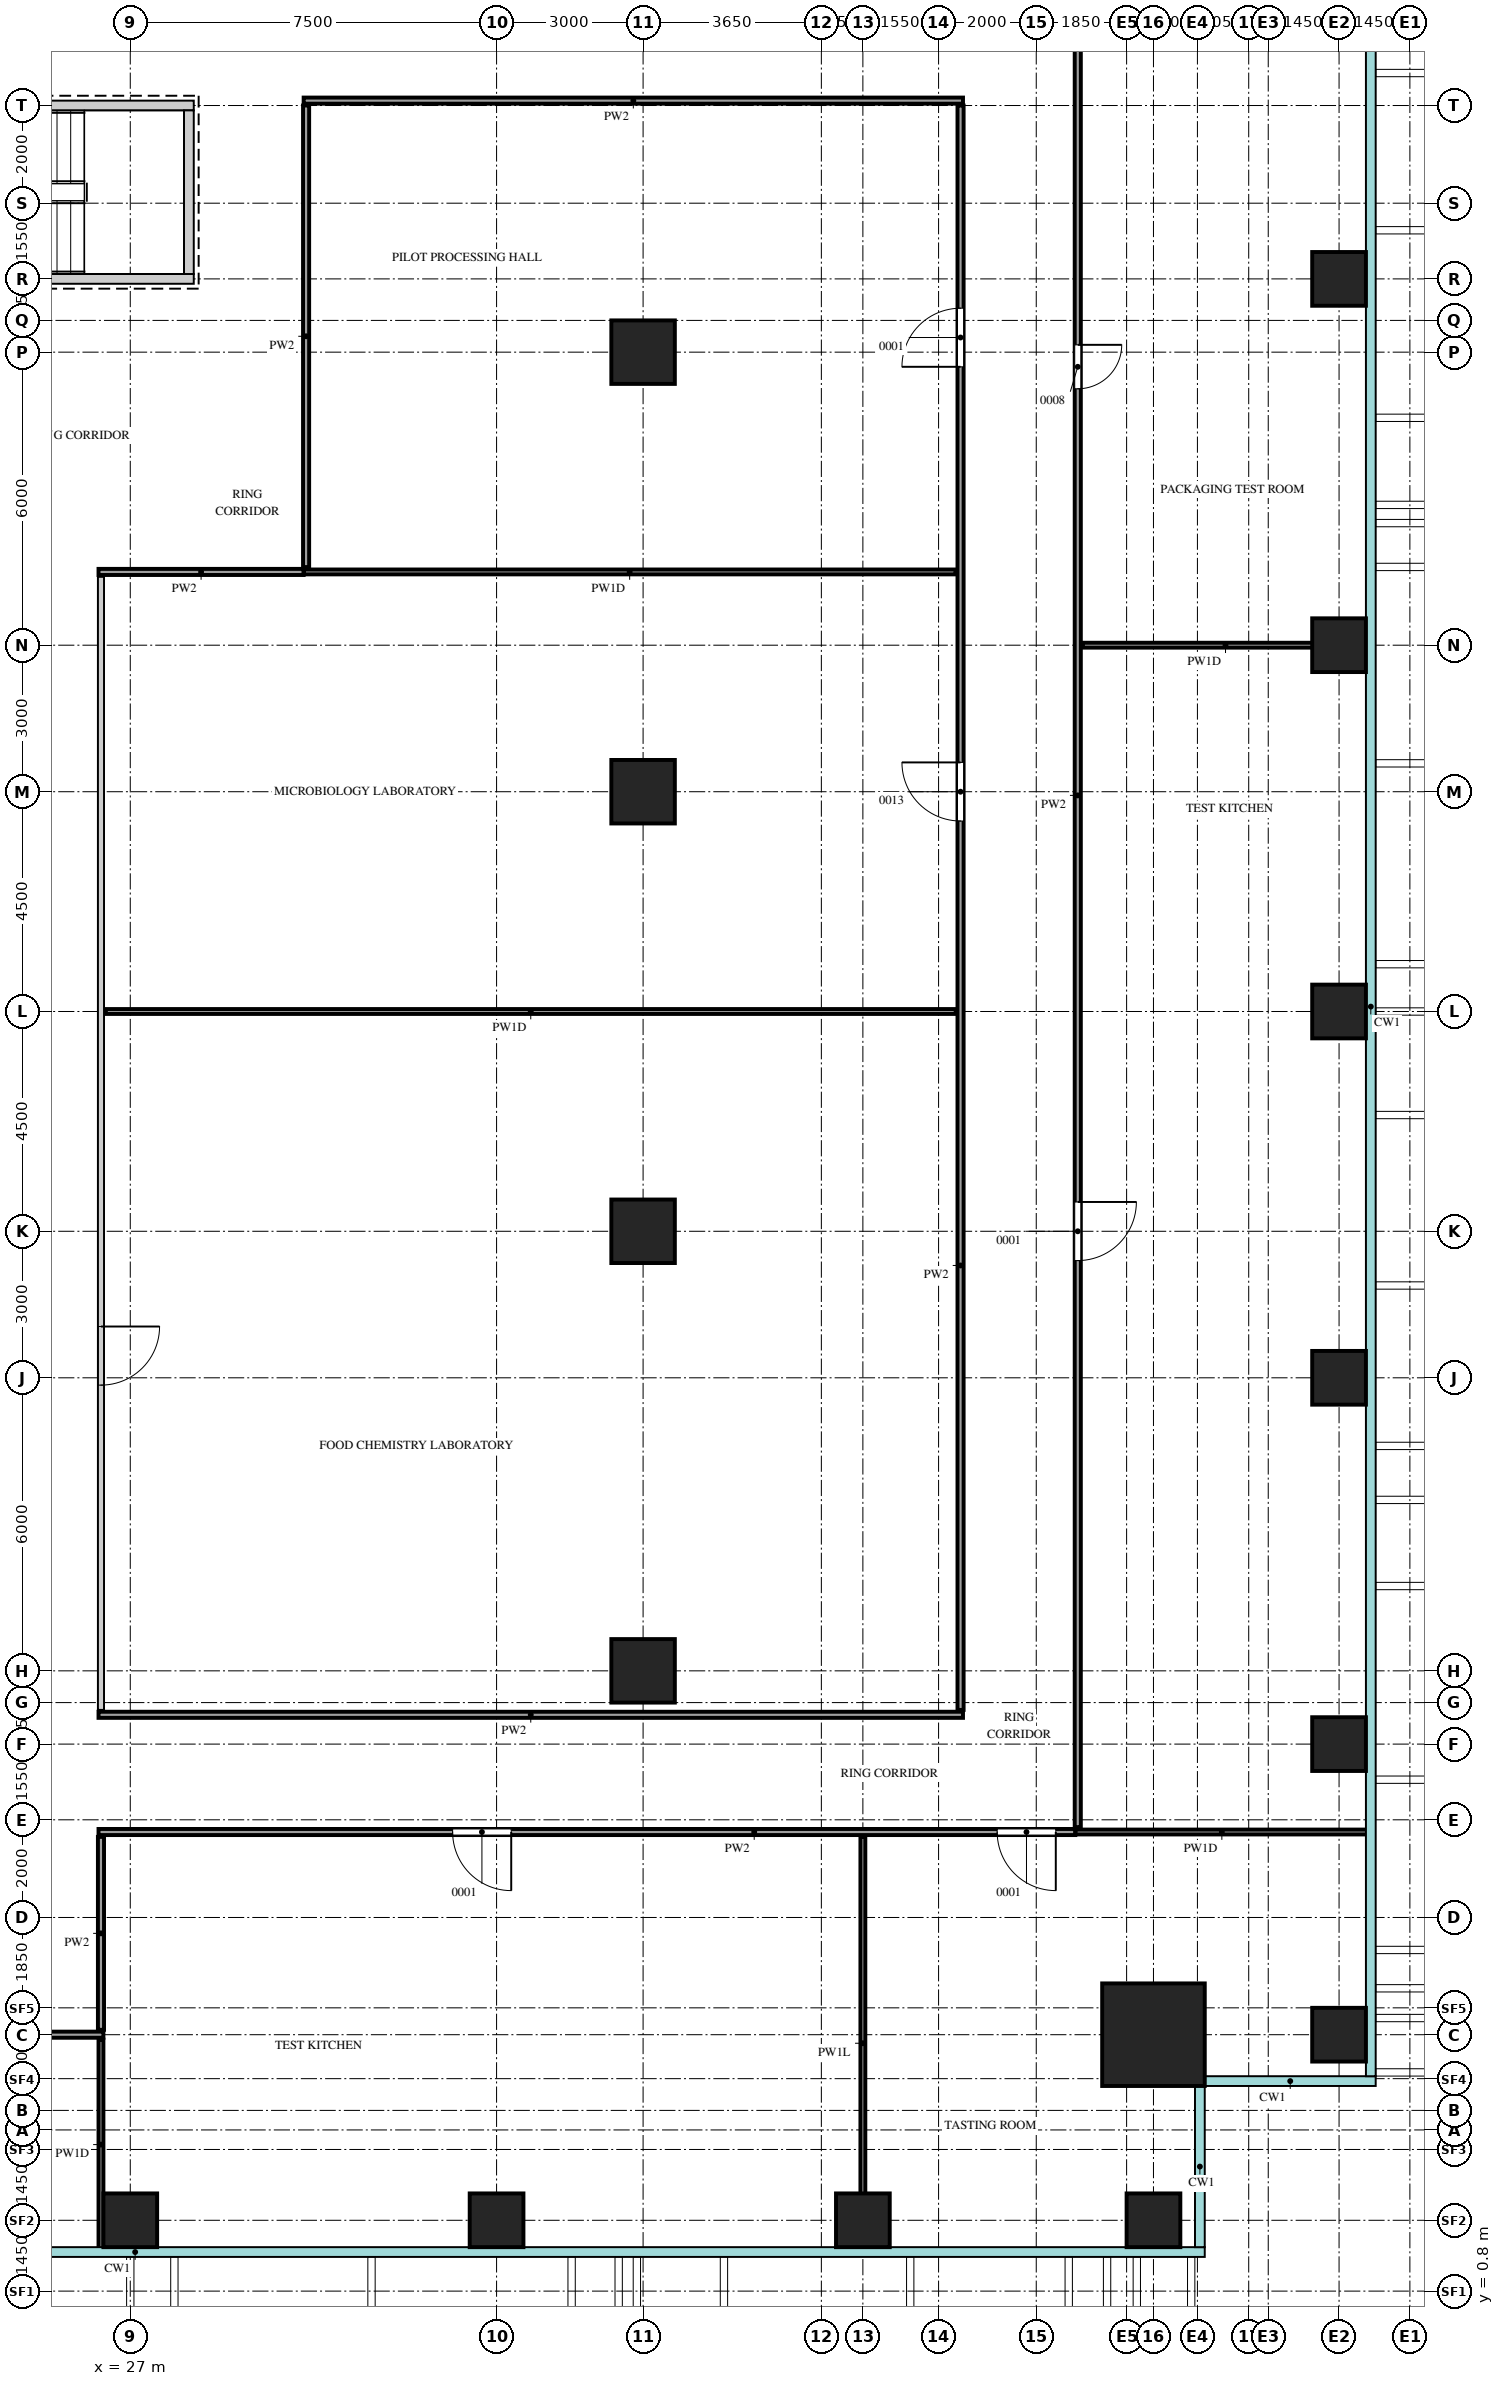
"""IFC4 building model, lengths in metres.
Left out: names, types, materials, properties, quantities, classifications, styles, units other than length and angle.
Written with IfcOpenShell. Run it as: python <this file> out.ifc"""

import sys

from ifc_helpers import new_model, si_unit, direction, frame, frame_2d, origin, origin_2d, place, context, subcontext, project, spatial, rectangle, extrude, source, transform, mapped, element, fill, save


model = new_model("IFC4")
c1 = context("Model", 3, precision=1e-05, world=origin(), true_north=direction((0.0, 1.0)))
c2 = subcontext(c1, "Body", "Model", "MODEL_VIEW")
j1 = project(units=[si_unit("LENGTHUNIT", "METRE"), si_unit("PLANEANGLEUNIT", "RADIAN")], contexts=[c1])
p1 = place(None, origin())
s1 = spatial("IfcSite", under=j1, at=p1, CompositionType="ELEMENT")
p2 = place(p1, origin())
s2 = spatial("IfcBuilding", under=s1, at=p2, CompositionType="ELEMENT")
p3 = place(p2, frame((0.0, 0.0, 114.7)))
s3 = spatial("IfcBuildingStorey", under=s2, at=p3, CompositionType="ELEMENT", Elevation=114.7)
m1 = source(origin(), c2, "Body", "SweptSolid", [
    extrude(rectangle(XDim=7.1, YDim=0.2, at=frame_2d((3.55, 0.0))), origin(), (0.0, 0.0, 1.0), 4.1),
])
p4 = place(p3, frame((21.2, 45.55, 0.0), z_axis=(0.0, 0.0, 1.0), x_axis=(1.0, 0.0, 0.0)))
e1 = element("IfcWall", 1, at=p4, inside=s3, PredefinedType="SHEAR", context=c2, shape_type="MappedRepresentation", body=[
    mapped(m1, transform((0.0, 0.0, 0.0))),
])
m2 = source(origin(), c2, "Body", "SweptSolid", [
    extrude(rectangle(XDim=1.2, YDim=2.1, at=frame_2d((0.6, 1.05))), frame((0.0, 0.11, 0.0), z_axis=(0.0, -1.0, 0.0), x_axis=(1.0, 0.0, 0.0)), (0.0, 0.0, 1.0), 0.22),
])
p5 = place(p4, frame((0.15, 0.0, 0.0)))
e2 = element("IfcOpeningElement", 2, at=p5, cuts=e1, PredefinedType="OPENING", context=c2, shape_type="MappedRepresentation", body=[
    mapped(m2, transform((0.0, 0.0, 0.0))),
])
p6 = place(p3, frame((21.2, 42.0, 0.0), z_axis=(0.0, 0.0, 1.0), x_axis=(1.0, 0.0, 0.0)))
e3 = element("IfcWall", 3, at=p6, inside=s3, PredefinedType="SHEAR", context=c2, shape_type="MappedRepresentation", body=[
    mapped(m1, transform((0.0, 0.0, 0.0))),
])
m3 = source(origin(), c2, "Body", "SweptSolid", [
    extrude(rectangle(XDim=3.35, YDim=0.2, at=frame_2d((1.675, 0.0))), origin(), (0.0, 0.0, 1.0), 4.1),
])
p7 = place(p3, frame((28.2, 42.1, 0.0), z_axis=(0.0, 0.0, 1.0), x_axis=(0.0, 1.0, 0.0)))
e4 = element("IfcWall", 4, at=p7, inside=s3, PredefinedType="SHEAR", context=c2, shape_type="MappedRepresentation", body=[
    mapped(m3, transform((0.0, 0.0, 0.0))),
])
m4 = source(origin(), c2, "Body", "SweptSolid", [
    extrude(rectangle(XDim=2.1, YDim=2.1, at=origin_2d()), origin(), (0.0, 0.0, 1.0), 4.4),
])
p8 = place(p3, frame((47.95, 6.05, 0.0), z_axis=(0.0, 0.0, 1.0), x_axis=(1.0, 0.0, 0.0)))
e5 = element("IfcColumn", 5, at=p8, inside=s3, PredefinedType="COLUMN", context=c2, shape_type="MappedRepresentation", body=[
    mapped(m4, transform((0.0, 0.0, 0.0))),
])
m5 = source(origin(), c2, "Body", "SweptSolid", [
    extrude(rectangle(XDim=1.1, YDim=1.1, at=origin_2d()), origin(), (0.0, 0.0, 1.0), 4.1),
])
for number, where, z_axis, x_axis in (
    (6, (27.0, 2.25, 0.0), (0.0, 0.0, 1.0), (1.0, 0.0, 0.0)),
    (7, (34.5, 2.25, 0.0), (0.0, 0.0, 1.0), (1.0, 0.0, 0.0)),
    (8, (42.0, 2.25, 0.0), (0.0, 0.0, 1.0), (1.0, 0.0, 0.0)),
    (9, (47.95, 2.25, 0.0), (0.0, 0.0, 1.0), (1.0, 0.0, 0.0)),
    (10, (51.75, 6.05, 0.0), (0.0, 0.0, 1.0), (1.0, 0.0, 0.0)),
    (11, (51.75, 12.0, 0.0), (0.0, 0.0, 1.0), (1.0, 0.0, 0.0)),
    (12, (51.75, 19.5, 0.0), (0.0, 0.0, 1.0), (1.0, 0.0, 0.0)),
    (13, (51.75, 27.0, 0.0), (0.0, 0.0, 1.0), (1.0, 0.0, 0.0)),
    (14, (51.75, 34.5, 0.0), (0.0, 0.0, 1.0), (1.0, 0.0, 0.0)),
    (15, (51.75, 42.0, 0.0), (0.0, 0.0, 1.0), (1.0, 0.0, 0.0)),
):
    element("IfcColumn", number, at=place(p3, frame(where, z_axis=z_axis, x_axis=x_axis)), inside=s3, PredefinedType="COLUMN", context=c2, shape_type="MappedRepresentation", body=[
        mapped(m5, transform((0.0, 0.0, 0.0))),
    ])
m6 = source(origin(), c2, "Body", "SweptSolid", [
    extrude(rectangle(XDim=1.3, YDim=1.3, at=origin_2d()), origin(), (0.0, 0.0, 1.0), 4.1),
])
for number, where, z_axis, x_axis in (
    (16, (37.5, 13.5, 0.0), (0.0, 0.0, 1.0), (1.0, 0.0, 0.0)),
    (17, (37.5, 22.5, 0.0), (0.0, 0.0, 1.0), (1.0, 0.0, 0.0)),
    (18, (37.5, 31.5, 0.0), (0.0, 0.0, 1.0), (1.0, 0.0, 0.0)),
    (19, (37.5, 40.5, 0.0), (0.0, 0.0, 1.0), (1.0, 0.0, 0.0)),
):
    element("IfcColumn", number, at=place(p3, frame(where, z_axis=z_axis, x_axis=x_axis)), inside=s3, PredefinedType="COLUMN", context=c2, shape_type="MappedRepresentation", body=[
        mapped(m6, transform((0.0, 0.0, 0.0))),
    ])
m7 = source(origin(), c2, "Body", "SweptSolid", [
    extrude(rectangle(XDim=4.3, YDim=0.1, at=frame_2d((2.15, 0.0))), origin(), (0.0, 0.0, 1.0), 4.2),
])
p9 = place(p3, frame((26.4, 1.65, 0.0), z_axis=(0.0, 0.0, 1.0), x_axis=(0.0, 1.0, 0.0)))
e20 = element("IfcWall", 20, at=p9, inside=s3, PredefinedType="PARTITIONING", context=c2, shape_type="MappedRepresentation", body=[
    mapped(m7, transform((0.0, 0.0, 0.0))),
])
m8 = source(origin(), c2, "Body", "SweptSolid", [
    extrude(rectangle(XDim=8.45, YDim=0.1, at=frame_2d((4.225, 0.0))), origin(), (0.0, 0.0, 1.0), 3.6),
])
p10 = place(p3, frame((42.0, 1.65, 0.0), z_axis=(0.0, 0.0, 1.0), x_axis=(0.0, 1.0, 0.0)))
e21 = element("IfcWall", 21, at=p10, inside=s3, PredefinedType="PARTITIONING", context=c2, shape_type="MappedRepresentation", body=[
    mapped(m8, transform((0.0, 0.0, 0.0))),
])
m9 = source(origin(), c2, "Body", "SweptSolid", [
    extrude(rectangle(XDim=22.3, YDim=0.125, at=frame_2d((11.15, 0.0))), origin(), (0.0, 0.0, 1.0), 3.55),
])
p11 = place(p3, frame((4.15, 6.05, 0.0), z_axis=(0.0, 0.0, 1.0), x_axis=(1.0, 0.0, 0.0)))
e22 = element("IfcWall", 22, at=p11, inside=s3, PredefinedType="PARTITIONING", context=c2, shape_type="MappedRepresentation", body=[
    mapped(m9, transform((0.0, 0.0, 0.0))),
])
m10 = source(origin(), c2, "Body", "SweptSolid", [
    extrude(rectangle(XDim=0.9, YDim=2.1, at=frame_2d((0.45, 1.05))), frame((0.0, 0.073, 0.0), z_axis=(0.0, -1.0, 0.0), x_axis=(1.0, 0.0, 0.0)), (0.0, 0.0, 1.0), 0.145),
])
p12 = place(p11, frame((7.25, 0.0, 0.0)))
e23 = element("IfcOpeningElement", 23, at=p12, cuts=e22, PredefinedType="OPENING", context=c2, shape_type="MappedRepresentation", body=[
    mapped(m10, transform((0.0, 0.0, 0.0))),
])
p13 = place(p11, frame((18.35, 0.0, 0.0)))
e24 = element("IfcOpeningElement", 24, at=p13, cuts=e22, PredefinedType="OPENING", context=c2, shape_type="MappedRepresentation", body=[
    mapped(m10, transform((0.0, 0.0, 0.0))),
])
m11 = source(origin(), c2, "Body", "SweptSolid", [
    extrude(rectangle(XDim=3.95, YDim=0.125, at=frame_2d((1.975, 0.0))), origin(), (0.0, 0.0, 1.0), 4.2),
])
p14 = place(p3, frame((26.4, 6.15, 0.0), z_axis=(0.0, 0.0, 1.0), x_axis=(0.0, 1.0, 0.0)))
e25 = element("IfcWall", 25, at=p14, inside=s3, PredefinedType="PARTITIONING", context=c2, shape_type="MappedRepresentation", body=[
    mapped(m11, transform((0.0, 0.0, 0.0))),
])
m12 = source(origin(), c2, "Body", "SweptSolid", [
    extrude(rectangle(XDim=20.0, YDim=0.125, at=frame_2d((10.0, 0.0))), origin(), (0.0, 0.0, 1.0), 4.2),
])
p15 = place(p3, frame((26.35, 10.2, 0.0), z_axis=(0.0, 0.0, 1.0), x_axis=(1.0, 0.0, 0.0)))
e26 = element("IfcWall", 26, at=p15, inside=s3, PredefinedType="PARTITIONING", context=c2, shape_type="MappedRepresentation", body=[
    mapped(m12, transform((0.0, 0.0, 0.0))),
])
m13 = source(origin(), c2, "Body", "SweptSolid", [
    extrude(rectangle(XDim=1.2, YDim=2.1, at=frame_2d((0.6, 1.05))), frame((0.0, 0.073, 0.0), z_axis=(0.0, -1.0, 0.0), x_axis=(1.0, 0.0, 0.0)), (0.0, 0.0, 1.0), 0.145),
])
p16 = place(p15, frame((7.25, 0.0, 0.0)))
e27 = element("IfcOpeningElement", 27, at=p16, cuts=e26, PredefinedType="OPENING", context=c2, shape_type="MappedRepresentation", body=[
    mapped(m13, transform((0.0, 0.0, 0.0))),
])
p17 = place(p15, frame((18.4, 0.0, 0.0)))
e28 = element("IfcOpeningElement", 28, at=p17, cuts=e26, PredefinedType="OPENING", context=c2, shape_type="MappedRepresentation", body=[
    mapped(m13, transform((0.0, 0.0, 0.0))),
])
m14 = source(origin(), c2, "Body", "SweptSolid", [
    extrude(rectangle(XDim=6.0, YDim=0.1, at=frame_2d((3.0, 0.0))), origin(), (0.0, 0.0, 1.0), 4.2),
])
p18 = place(p3, frame((46.35, 10.2, 0.0), z_axis=(0.0, 0.0, 1.0), x_axis=(1.0, 0.0, 0.0)))
e29 = element("IfcWall", 29, at=p18, inside=s3, PredefinedType="PARTITIONING", context=c2, shape_type="MappedRepresentation", body=[
    mapped(m14, transform((0.0, 0.0, 0.0))),
])
m15 = source(origin(), c2, "Body", "SweptSolid", [
    extrude(rectangle(XDim=37.65, YDim=0.125, at=frame_2d((18.825, 0.0))), origin(), (0.0, 0.0, 1.0), 4.2),
])
p19 = place(p3, frame((46.4, 10.3, 0.0), z_axis=(0.0, 0.0, 1.0), x_axis=(0.0, 1.0, 0.0)))
e30 = element("IfcWall", 30, at=p19, inside=s3, PredefinedType="PARTITIONING", context=c2, shape_type="MappedRepresentation", body=[
    mapped(m15, transform((0.0, 0.0, 0.0))),
])
p20 = place(p19, frame((11.6, 0.0, 0.0)))
e31 = element("IfcOpeningElement", 31, at=p20, cuts=e30, PredefinedType="OPENING", context=c2, shape_type="MappedRepresentation", body=[
    mapped(m13, transform((0.0, 0.0, 0.0))),
])
p21 = place(p19, frame((29.45, 0.0, 0.0)))
e32 = element("IfcOpeningElement", 32, at=p21, cuts=e30, PredefinedType="OPENING", context=c2, shape_type="MappedRepresentation", body=[
    mapped(m10, transform((0.0, 0.0, 0.0))),
])
m16 = source(origin(), c2, "Body", "SweptSolid", [
    extrude(rectangle(XDim=17.7, YDim=0.125, at=frame_2d((8.85, 0.0))), origin(), (0.0, 0.0, 1.0), 4.2),
])
p22 = place(p3, frame((26.35, 12.6, 0.0), z_axis=(0.0, 0.0, 1.0), x_axis=(1.0, 0.0, 0.0)))
e33 = element("IfcWall", 33, at=p22, inside=s3, PredefinedType="PARTITIONING", context=c2, shape_type="MappedRepresentation", body=[
    mapped(m16, transform((0.0, 0.0, 0.0))),
])
m17 = source(origin(), c2, "Body", "SweptSolid", [
    extrude(rectangle(XDim=23.2, YDim=0.125, at=frame_2d((11.6, 0.0))), origin(), (0.0, 0.0, 1.0), 4.2),
])
p23 = place(p3, frame((26.4, 12.7, 0.0), z_axis=(0.0, 0.0, 1.0), x_axis=(0.0, 1.0, 0.0)))
e34 = element("IfcWall", 34, at=p23, inside=s3, PredefinedType="PARTITIONING", context=c2, shape_type="MappedRepresentation", body=[
    mapped(m17, transform((0.0, 0.0, 0.0))),
])
p24 = place(p23, frame((6.65, 0.0, 0.0)))
e35 = element("IfcOpeningElement", 35, at=p24, cuts=e34, PredefinedType="OPENING", context=c2, shape_type="MappedRepresentation", body=[
    mapped(m13, transform((0.0, 0.0, 0.0))),
])
m18 = source(origin(), c2, "Body", "SweptSolid", [
    extrude(rectangle(XDim=32.85, YDim=0.125, at=frame_2d((16.425, 0.0))), origin(), (0.0, 0.0, 1.0), 4.2),
])
p25 = place(p3, frame((44.0, 12.7, 0.0), z_axis=(0.0, 0.0, 1.0), x_axis=(0.0, 1.0, 0.0)))
e36 = element("IfcWall", 36, at=p25, inside=s3, PredefinedType="PARTITIONING", context=c2, shape_type="MappedRepresentation", body=[
    mapped(m18, transform((0.0, 0.0, 0.0))),
])
p26 = place(p25, frame((18.2, 0.0, 0.0)))
e37 = element("IfcOpeningElement", 37, at=p26, cuts=e36, PredefinedType="OPENING", context=c2, shape_type="MappedRepresentation", body=[
    mapped(m13, transform((0.0, 0.0, 0.0))),
])
p27 = place(p25, frame((27.5, 0.0, 0.0)))
e38 = element("IfcOpeningElement", 38, at=p27, cuts=e36, PredefinedType="OPENING", context=c2, shape_type="MappedRepresentation", body=[
    mapped(m13, transform((0.0, 0.0, 0.0))),
])
m19 = source(origin(), c2, "Body", "SweptSolid", [
    extrude(rectangle(XDim=17.4, YDim=0.1, at=frame_2d((8.7, 0.0))), origin(), (0.0, 0.0, 1.0), 4.2),
])
p28 = place(p3, frame((26.5, 27.0, 0.0), z_axis=(0.0, 0.0, 1.0), x_axis=(1.0, 0.0, 0.0)))
e39 = element("IfcWall", 39, at=p28, inside=s3, PredefinedType="PARTITIONING", context=c2, shape_type="MappedRepresentation", body=[
    mapped(m19, transform((0.0, 0.0, 0.0))),
])
m20 = source(origin(), c2, "Body", "SweptSolid", [
    extrude(rectangle(XDim=5.85, YDim=0.1, at=frame_2d((2.925, 0.0))), origin(), (0.0, 0.0, 1.0), 4.2),
])
p29 = place(p3, frame((46.5, 34.5, 0.0), z_axis=(0.0, 0.0, 1.0), x_axis=(1.0, 0.0, 0.0)))
e40 = element("IfcWall", 40, at=p29, inside=s3, PredefinedType="PARTITIONING", context=c2, shape_type="MappedRepresentation", body=[
    mapped(m20, transform((0.0, 0.0, 0.0))),
])
m21 = source(origin(), c2, "Body", "SweptSolid", [
    extrude(rectangle(XDim=4.2, YDim=0.125, at=frame_2d((2.1, 0.0))), origin(), (0.0, 0.0, 1.0), 4.2),
])
p30 = place(p3, frame((26.35, 36.0, 0.0), z_axis=(0.0, 0.0, 1.0), x_axis=(1.0, 0.0, 0.0)))
e41 = element("IfcWall", 41, at=p30, inside=s3, PredefinedType="PARTITIONING", context=c2, shape_type="MappedRepresentation", body=[
    mapped(m21, transform((0.0, 0.0, 0.0))),
])
m22 = source(origin(), c2, "Body", "SweptSolid", [
    extrude(rectangle(XDim=13.35, YDim=0.1, at=frame_2d((6.675, 0.0))), origin(), (0.0, 0.0, 1.0), 4.2),
])
p31 = place(p3, frame((30.55, 36.0, 0.0), z_axis=(0.0, 0.0, 1.0), x_axis=(1.0, 0.0, 0.0)))
e42 = element("IfcWall", 42, at=p31, inside=s3, PredefinedType="PARTITIONING", context=c2, shape_type="MappedRepresentation", body=[
    mapped(m22, transform((0.0, 0.0, 0.0))),
])
m23 = source(origin(), c2, "Body", "SweptSolid", [
    extrude(rectangle(XDim=9.45, YDim=0.125, at=frame_2d((4.725, 0.0))), origin(), (0.0, 0.0, 1.0), 4.2),
])
p32 = place(p3, frame((30.6, 36.1, 0.0), z_axis=(0.0, 0.0, 1.0), x_axis=(0.0, 1.0, 0.0)))
e43 = element("IfcWall", 43, at=p32, inside=s3, PredefinedType="PARTITIONING", context=c2, shape_type="MappedRepresentation", body=[
    mapped(m23, transform((0.0, 0.0, 0.0))),
])
m24 = source(origin(), c2, "Body", "SweptSolid", [
    extrude(rectangle(XDim=13.5, YDim=0.125, at=frame_2d((6.75, 0.0))), origin(), (0.0, 0.0, 1.0), 4.2),
])
p33 = place(p3, frame((30.55, 45.65, 0.0), z_axis=(0.0, 0.0, 1.0), x_axis=(1.0, 0.0, 0.0)))
e44 = element("IfcWall", 44, at=p33, inside=s3, PredefinedType="PARTITIONING", context=c2, shape_type="MappedRepresentation", body=[
    mapped(m24, transform((0.0, 0.0, 0.0))),
])
m25 = source(origin(), c2, "Body", "SweptSolid", [
    extrude(rectangle(XDim=1.2, YDim=2.1, at=frame_2d((0.6, 1.05))), frame((0.0, 0.025, 0.0), z_axis=(0.0, -1.0, 0.0), x_axis=(1.0, 0.0, 0.0)), (0.0, 0.0, 1.0), 0.05),
])
p34 = place(p16, origin())
e45 = element("IfcDoor", 45, at=p34, inside=s3, OperationType="SINGLE_SWING_RIGHT", PredefinedType="DOOR", context=c2, shape_type="MappedRepresentation", body=[
    mapped(m25, transform((0.0, 0.0, 0.0))),
])
fill(e27, e45)
p35 = place(p17, origin())
e46 = element("IfcDoor", 46, at=p35, inside=s3, OperationType="SINGLE_SWING_RIGHT", PredefinedType="DOOR", context=c2, shape_type="MappedRepresentation", body=[
    mapped(m25, transform((0.0, 0.0, 0.0))),
])
fill(e28, e46)
p36 = place(p24, origin())
e47 = element("IfcDoor", 47, at=p36, inside=s3, OperationType="SINGLE_SWING_RIGHT", PredefinedType="DOOR", context=c2, shape_type="MappedRepresentation", body=[
    mapped(m25, transform((0.0, 0.0, 0.0))),
])
fill(e35, e47)
p37 = place(p26, origin())
e48 = element("IfcDoor", 48, at=p37, inside=s3, OperationType="SINGLE_SWING_LEFT", PredefinedType="DOOR", context=c2, shape_type="MappedRepresentation", body=[
    mapped(m25, transform((0.0, 0.0, 0.0))),
])
fill(e37, e48)
p38 = place(p27, origin())
e49 = element("IfcDoor", 49, at=p38, inside=s3, OperationType="SINGLE_SWING_RIGHT", PredefinedType="DOOR", context=c2, shape_type="MappedRepresentation", body=[
    mapped(m25, transform((0.0, 0.0, 0.0))),
])
fill(e38, e49)
p39 = place(p20, origin())
e50 = element("IfcDoor", 50, at=p39, inside=s3, OperationType="SINGLE_SWING_RIGHT", PredefinedType="DOOR", context=c2, shape_type="MappedRepresentation", body=[
    mapped(m25, transform((0.0, 0.0, 0.0))),
])
fill(e31, e50)
m26 = source(origin(), c2, "Body", "SweptSolid", [
    extrude(rectangle(XDim=0.9, YDim=2.1, at=frame_2d((0.45, 1.05))), frame((0.0, 0.025, 0.0), z_axis=(0.0, -1.0, 0.0), x_axis=(1.0, 0.0, 0.0)), (0.0, 0.0, 1.0), 0.05),
])
p40 = place(p21, origin())
e51 = element("IfcDoor", 51, at=p40, inside=s3, OperationType="SINGLE_SWING_RIGHT", PredefinedType="DOOR", context=c2, shape_type="MappedRepresentation", body=[
    mapped(m26, transform((0.0, 0.0, 0.0))),
])
fill(e32, e51)
save(model, sys.argv[1])
